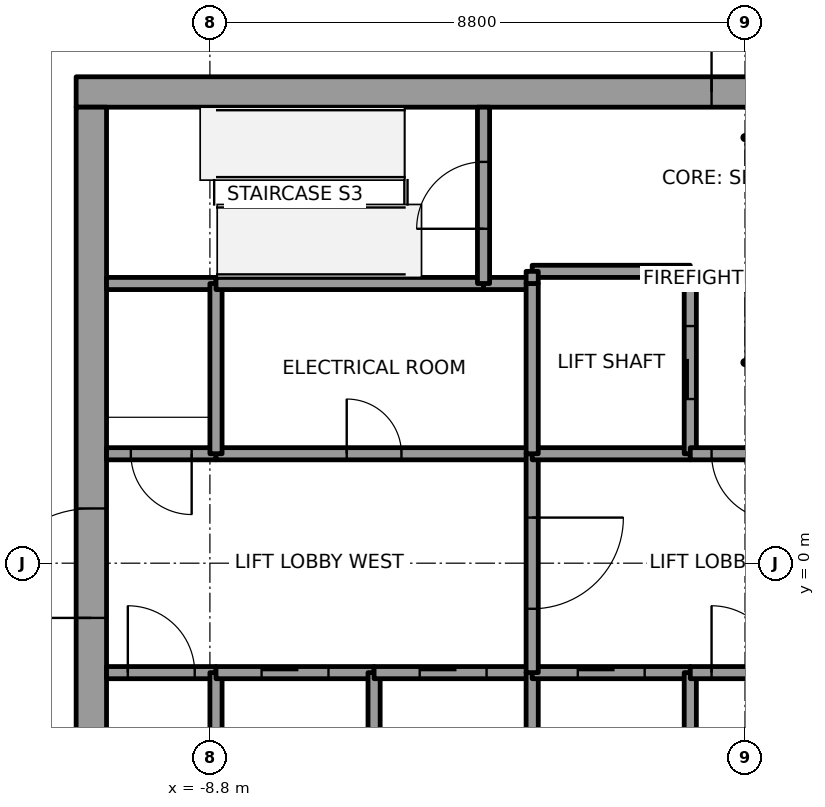
"""IFC4 building model, lengths in metres.
Left out: names, types, materials, properties, quantities, classifications, styles, units other than length and angle.
Written with IfcOpenShell. Run it as: python <this file> out.ifc"""

import sys

from ifc_helpers import new_model, si_unit, direction, frame, frame_2d, origin, place, context, subcontext, project, spatial, rectangle, extrude, element, fill, save


model = new_model("IFC4")
c1 = context("Model", 3, precision=1e-05, world=origin(), true_north=direction((0.0, 1.0)))
c2 = subcontext(c1, "Body", "Model", "MODEL_VIEW")
j1 = project(units=[si_unit("LENGTHUNIT", "METRE"), si_unit("PLANEANGLEUNIT", "RADIAN")], contexts=[c1])
p1 = place(None, origin())
s1 = spatial("IfcSite", under=j1, at=p1, CompositionType="ELEMENT")
p2 = place(p1, origin())
s2 = spatial("IfcBuilding", under=s1, at=p2, CompositionType="ELEMENT")
p3 = place(p2, frame((0.0, 0.0, 295.0)))
s3 = spatial("IfcBuildingStorey", under=s2, at=p3, CompositionType="ELEMENT", Elevation=295.0)
p4 = place(p3, frame((-11.0, 7.75, 0.0), z_axis=(0.0, 0.0, 1.0), x_axis=(1.0, 0.0, 0.0)))
e1 = element("IfcWall", 1, at=p4, inside=s3, PredefinedType="SHEAR", context=c2, shape_type="SweptSolid", body=[
    extrude(rectangle(XDim=22.0, YDim=0.5, at=frame_2d((11.0, 0.0))), origin(), (0.0, 0.0, 1.0), 4.0),
])
p5 = place(p4, frame((10.45, 0.0, 0.0)))
e2 = element("IfcOpeningElement", 2, at=p5, cuts=e1, PredefinedType="OPENING", context=c2, shape_type="SweptSolid", body=[
    extrude(rectangle(XDim=1.1, YDim=2.1, at=frame_2d((0.55, 1.05))), frame((0.0, 0.25, 0.0), z_axis=(0.0, -1.0, 0.0), x_axis=(1.0, 0.0, 0.0)), (0.0, 0.0, 1.0), 0.5),
])
p6 = place(p3, frame((-10.75, -7.5, 0.0), z_axis=(0.0, 0.0, 1.0), x_axis=(0.0, 1.0, 0.0)))
e3 = element("IfcWall", 3, at=p6, inside=s3, PredefinedType="SHEAR", context=c2, shape_type="SweptSolid", body=[
    extrude(rectangle(XDim=15.0, YDim=0.5, at=frame_2d((7.5, 0.0))), origin(), (0.0, 0.0, 1.0), 4.0),
])
p7 = place(p6, frame((6.6, 0.0, 0.0)))
e4 = element("IfcOpeningElement", 4, at=p7, cuts=e3, PredefinedType="OPENING", context=c2, shape_type="SweptSolid", body=[
    extrude(rectangle(XDim=1.8, YDim=2.1, at=frame_2d((0.9, 1.05))), frame((0.0, 0.25, 0.0), z_axis=(0.0, -1.0, 0.0), x_axis=(1.0, 0.0, 0.0)), (0.0, 0.0, 1.0), 0.5),
])
p8 = place(p3, frame((-10.5, -1.8, 0.0), z_axis=(0.0, 0.0, 1.0), x_axis=(1.0, 0.0, 0.0)))
e5 = element("IfcWall", 5, at=p8, inside=s3, PredefinedType="SOLIDWALL", context=c2, shape_type="SweptSolid", body=[
    extrude(rectangle(XDim=1.8, YDim=0.2, at=frame_2d((0.9, 0.0))), origin(), (0.0, 0.0, 1.0), 3.85),
])
p9 = place(p8, frame((0.35, 0.0, 0.0)))
e6 = element("IfcOpeningElement", 6, at=p9, cuts=e5, PredefinedType="OPENING", context=c2, shape_type="SweptSolid", body=[
    extrude(rectangle(XDim=1.1, YDim=2.1, at=frame_2d((0.55, 1.05))), frame((0.0, 0.1, 0.0), z_axis=(0.0, -1.0, 0.0), x_axis=(1.0, 0.0, 0.0)), (0.0, 0.0, 1.0), 0.2),
])
p10 = place(p3, frame((-8.7, 1.8, 0.0), z_axis=(0.0, 0.0, 1.0), x_axis=(-1.0, 0.0, 0.0)))
e7 = element("IfcWall", 7, at=p10, inside=s3, PredefinedType="SOLIDWALL", context=c2, shape_type="SweptSolid", body=[
    extrude(rectangle(XDim=1.8, YDim=0.2, at=frame_2d((0.9, 0.0))), origin(), (0.0, 0.0, 1.0), 3.85),
])
p11 = place(p10, frame((0.4, 0.0, 0.0)))
e8 = element("IfcOpeningElement", 8, at=p11, cuts=e7, PredefinedType="OPENING", context=c2, shape_type="SweptSolid", body=[
    extrude(rectangle(XDim=1.0, YDim=2.1, at=frame_2d((0.5, 1.05))), frame((0.0, 0.1, 0.0), z_axis=(0.0, -1.0, 0.0), x_axis=(1.0, 0.0, 0.0)), (0.0, 0.0, 1.0), 0.2),
])
p12 = place(p3, frame((-8.7, 4.6, 0.0), z_axis=(0.0, 0.0, 1.0), x_axis=(-1.0, 0.0, 0.0)))
e9 = element("IfcWall", 9, at=p12, inside=s3, PredefinedType="SOLIDWALL", context=c2, shape_type="SweptSolid", body=[
    extrude(rectangle(XDim=1.8, YDim=0.2, at=frame_2d((0.9, 0.0))), origin(), (0.0, 0.0, 1.0), 3.85),
])
p13 = place(p3, frame((-8.7, -4.6, 0.0), z_axis=(0.0, 0.0, 1.0), x_axis=(0.0, 1.0, 0.0)))
e10 = element("IfcWall", 10, at=p13, inside=s3, PredefinedType="SOLIDWALL", context=c2, shape_type="SweptSolid", body=[
    extrude(rectangle(XDim=2.8, YDim=0.2, at=frame_2d((1.4, 0.0))), origin(), (0.0, 0.0, 1.0), 3.85),
])
p14 = place(p3, frame((-8.7, -1.8, 0.0), z_axis=(0.0, 0.0, 1.0), x_axis=(1.0, 0.0, 0.0)))
e11 = element("IfcWall", 11, at=p14, inside=s3, PredefinedType="SOLIDWALL", context=c2, shape_type="SweptSolid", body=[
    extrude(rectangle(XDim=2.6, YDim=0.2, at=frame_2d((1.3, 0.0))), origin(), (0.0, 0.0, 1.0), 3.85),
])
p15 = place(p14, frame((0.75, 0.0, 0.0)))
e12 = element("IfcOpeningElement", 12, at=p15, cuts=e11, PredefinedType="OPENING", context=c2, shape_type="SweptSolid", body=[
    extrude(rectangle(XDim=1.1, YDim=2.1, at=frame_2d((0.55, 1.05))), frame((0.0, 0.1, 0.0), z_axis=(0.0, -1.0, 0.0), x_axis=(1.0, 0.0, 0.0)), (0.0, 0.0, 1.0), 0.2),
])
p16 = place(p3, frame((-8.7, 1.8, 0.0), z_axis=(0.0, 0.0, 1.0), x_axis=(1.0, 0.0, 0.0)))
e13 = element("IfcWall", 13, at=p16, inside=s3, PredefinedType="SOLIDWALL", context=c2, shape_type="SweptSolid", body=[
    extrude(rectangle(XDim=5.2, YDim=0.2, at=frame_2d((2.6, 0.0))), origin(), (0.0, 0.0, 1.0), 3.85),
])
p17 = place(p16, frame((2.15, 0.0, 0.0)))
e14 = element("IfcOpeningElement", 14, at=p17, cuts=e13, PredefinedType="OPENING", context=c2, shape_type="SweptSolid", body=[
    extrude(rectangle(XDim=0.9, YDim=2.1, at=frame_2d((0.45, 1.05))), frame((0.0, 0.1, 0.0), z_axis=(0.0, -1.0, 0.0), x_axis=(1.0, 0.0, 0.0)), (0.0, 0.0, 1.0), 0.2),
])
p18 = place(p3, frame((-8.7, 4.6, 0.0), z_axis=(0.0, 0.0, 1.0), x_axis=(0.0, -1.0, 0.0)))
e15 = element("IfcWall", 15, at=p18, inside=s3, PredefinedType="SOLIDWALL", context=c2, shape_type="SweptSolid", body=[
    extrude(rectangle(XDim=2.8, YDim=0.2, at=frame_2d((1.4, 0.0))), origin(), (0.0, 0.0, 1.0), 3.85),
])
p19 = place(p3, frame((-4.3, 4.6, 0.0), z_axis=(0.0, 0.0, 1.0), x_axis=(-1.0, 0.0, 0.0)))
e16 = element("IfcWall", 16, at=p19, inside=s3, PredefinedType="SOLIDWALL", context=c2, shape_type="SweptSolid", body=[
    extrude(rectangle(XDim=4.4, YDim=0.2, at=frame_2d((2.2, 0.0))), origin(), (0.0, 0.0, 1.0), 3.85),
])
p20 = place(p3, frame((-6.1, -4.6, 0.0), z_axis=(0.0, 0.0, 1.0), x_axis=(0.0, 1.0, 0.0)))
e17 = element("IfcWall", 17, at=p20, inside=s3, PredefinedType="SOLIDWALL", context=c2, shape_type="SweptSolid", body=[
    extrude(rectangle(XDim=2.8, YDim=0.2, at=frame_2d((1.4, 0.0))), origin(), (0.0, 0.0, 1.0), 3.85),
])
p21 = place(p3, frame((-6.1, -1.8, 0.0), z_axis=(0.0, 0.0, 1.0), x_axis=(1.0, 0.0, 0.0)))
e18 = element("IfcWall", 18, at=p21, inside=s3, PredefinedType="SOLIDWALL", context=c2, shape_type="SweptSolid", body=[
    extrude(rectangle(XDim=2.6, YDim=0.2, at=frame_2d((1.3, 0.0))), origin(), (0.0, 0.0, 1.0), 3.85),
])
p22 = place(p21, frame((0.75, 0.0, 0.0)))
e19 = element("IfcOpeningElement", 19, at=p22, cuts=e18, PredefinedType="OPENING", context=c2, shape_type="SweptSolid", body=[
    extrude(rectangle(XDim=1.1, YDim=2.1, at=frame_2d((0.55, 1.05))), frame((0.0, 0.1, 0.0), z_axis=(0.0, -1.0, 0.0), x_axis=(1.0, 0.0, 0.0)), (0.0, 0.0, 1.0), 0.2),
])
p23 = place(p3, frame((-3.5, 4.6, 0.0), z_axis=(0.0, 0.0, 1.0), x_axis=(-1.0, 0.0, 0.0)))
e20 = element("IfcWall", 20, at=p23, inside=s3, PredefinedType="SOLIDWALL", context=c2, shape_type="SweptSolid", body=[
    extrude(rectangle(XDim=0.8, YDim=0.2, at=frame_2d((0.4, 0.0))), origin(), (0.0, 0.0, 1.0), 3.85),
])
p24 = place(p3, frame((-4.3, 4.6, 0.0), z_axis=(0.0, 0.0, 1.0), x_axis=(0.0, 1.0, 0.0)))
e21 = element("IfcWall", 21, at=p24, inside=s3, PredefinedType="SOLIDWALL", context=c2, shape_type="SweptSolid", body=[
    extrude(rectangle(XDim=2.9, YDim=0.2, at=frame_2d((1.45, 0.0))), origin(), (0.0, 0.0, 1.0), 3.85),
])
p25 = place(p24, frame((0.9, 0.0, 0.0)))
e22 = element("IfcOpeningElement", 22, at=p25, cuts=e21, PredefinedType="OPENING", context=c2, shape_type="SweptSolid", body=[
    extrude(rectangle(XDim=1.1, YDim=2.1, at=frame_2d((0.55, 1.05))), frame((0.0, 0.1, 0.0), z_axis=(0.0, -1.0, 0.0), x_axis=(1.0, 0.0, 0.0)), (0.0, 0.0, 1.0), 0.2),
])
p26 = place(p3, frame((-3.5, -4.6, 0.0), z_axis=(0.0, 0.0, 1.0), x_axis=(0.0, 1.0, 0.0)))
e23 = element("IfcWall", 23, at=p26, inside=s3, PredefinedType="SOLIDWALL", context=c2, shape_type="SweptSolid", body=[
    extrude(rectangle(XDim=2.8, YDim=0.2, at=frame_2d((1.4, 0.0))), origin(), (0.0, 0.0, 1.0), 3.85),
])
p27 = place(p3, frame((-3.5, -1.8, 0.0), z_axis=(0.0, 0.0, 1.0), x_axis=(1.0, 0.0, 0.0)))
e24 = element("IfcWall", 24, at=p27, inside=s3, PredefinedType="SOLIDWALL", context=c2, shape_type="SweptSolid", body=[
    extrude(rectangle(XDim=2.6, YDim=0.2, at=frame_2d((1.3, 0.0))), origin(), (0.0, 0.0, 1.0), 3.85),
])
p28 = place(p27, frame((0.75, 0.0, 0.0)))
e25 = element("IfcOpeningElement", 25, at=p28, cuts=e24, PredefinedType="OPENING", context=c2, shape_type="SweptSolid", body=[
    extrude(rectangle(XDim=1.1, YDim=2.1, at=frame_2d((0.55, 1.05))), frame((0.0, 0.1, 0.0), z_axis=(0.0, -1.0, 0.0), x_axis=(1.0, 0.0, 0.0)), (0.0, 0.0, 1.0), 0.2),
])
p29 = place(p3, frame((-3.5, 1.8, 0.0), z_axis=(0.0, 0.0, 1.0), x_axis=(0.0, -1.0, 0.0)))
e26 = element("IfcWall", 26, at=p29, inside=s3, PredefinedType="SOLIDWALL", context=c2, shape_type="SweptSolid", body=[
    extrude(rectangle(XDim=3.6, YDim=0.2, at=frame_2d((1.8, 0.0))), origin(), (0.0, 0.0, 1.0), 3.85),
])
p30 = place(p29, frame((1.05, 0.0, 0.0)))
e27 = element("IfcOpeningElement", 27, at=p30, cuts=e26, PredefinedType="OPENING", context=c2, shape_type="SweptSolid", body=[
    extrude(rectangle(XDim=1.5, YDim=2.1, at=frame_2d((0.75, 1.05))), frame((0.0, 0.1, 0.0), z_axis=(0.0, -1.0, 0.0), x_axis=(1.0, 0.0, 0.0)), (0.0, 0.0, 1.0), 0.2),
])
p31 = place(p3, frame((-0.9, 1.8, 0.0), z_axis=(0.0, 0.0, 1.0), x_axis=(-1.0, 0.0, 0.0)))
e28 = element("IfcWall", 28, at=p31, inside=s3, PredefinedType="SOLIDWALL", context=c2, shape_type="SweptSolid", body=[
    extrude(rectangle(XDim=2.6, YDim=0.2, at=frame_2d((1.3, 0.0))), origin(), (0.0, 0.0, 1.0), 3.85),
])
p32 = place(p3, frame((-3.5, 1.8, 0.0), z_axis=(0.0, 0.0, 1.0), x_axis=(0.0, 1.0, 0.0)))
e29 = element("IfcWall", 29, at=p32, inside=s3, PredefinedType="SOLIDWALL", context=c2, shape_type="SweptSolid", body=[
    extrude(rectangle(XDim=2.8, YDim=0.2, at=frame_2d((1.4, 0.0))), origin(), (0.0, 0.0, 1.0), 3.85),
])
p33 = place(p3, frame((-0.9, 1.8, 0.0), z_axis=(0.0, 0.0, 1.0), x_axis=(0.0, 1.0, 0.0)))
e30 = element("IfcWall", 30, at=p33, inside=s3, PredefinedType="SOLIDWALL", context=c2, shape_type="SweptSolid", body=[
    extrude(rectangle(XDim=3.0, YDim=0.2, at=frame_2d((1.5, 0.0))), origin(), (0.0, 0.0, 1.0), 3.85),
])
p34 = place(p33, frame((0.9, 0.0, 0.0)))
e31 = element("IfcOpeningElement", 31, at=p34, cuts=e30, PredefinedType="OPENING", context=c2, shape_type="SweptSolid", body=[
    extrude(rectangle(XDim=1.2, YDim=2.1, at=frame_2d((0.6, 1.05))), frame((0.0, 0.1, 0.0), z_axis=(0.0, -1.0, 0.0), x_axis=(1.0, 0.0, 0.0)), (0.0, 0.0, 1.0), 0.2),
])
p35 = place(p3, frame((-0.9, 4.8, 0.0), z_axis=(0.0, 0.0, 1.0), x_axis=(-1.0, 0.0, 0.0)))
e32 = element("IfcWall", 32, at=p35, inside=s3, PredefinedType="SOLIDWALL", context=c2, shape_type="SweptSolid", body=[
    extrude(rectangle(XDim=2.6, YDim=0.2, at=frame_2d((1.3, 0.0))), origin(), (0.0, 0.0, 1.0), 3.85),
])
p36 = place(p3, frame((-3.5, 4.8, 0.0), z_axis=(0.0, 0.0, 1.0), x_axis=(0.0, -1.0, 0.0)))
e33 = element("IfcWall", 33, at=p36, inside=s3, PredefinedType="SOLIDWALL", context=c2, shape_type="SweptSolid", body=[
    extrude(rectangle(XDim=0.2, YDim=0.2, at=frame_2d((0.1, 0.0))), origin(), (0.0, 0.0, 1.0), 3.85),
])
p37 = place(p3, frame((-0.9, -4.6, 0.0), z_axis=(0.0, 0.0, 1.0), x_axis=(0.0, 1.0, 0.0)))
e34 = element("IfcWall", 34, at=p37, inside=s3, PredefinedType="SOLIDWALL", context=c2, shape_type="SweptSolid", body=[
    extrude(rectangle(XDim=2.8, YDim=0.2, at=frame_2d((1.4, 0.0))), origin(), (0.0, 0.0, 1.0), 3.85),
])
p38 = place(p3, frame((-0.9, -1.8, 0.0), z_axis=(0.0, 0.0, 1.0), x_axis=(1.0, 0.0, 0.0)))
e35 = element("IfcWall", 35, at=p38, inside=s3, PredefinedType="SOLIDWALL", context=c2, shape_type="SweptSolid", body=[
    extrude(rectangle(XDim=1.8, YDim=0.2, at=frame_2d((0.9, 0.0))), origin(), (0.0, 0.0, 1.0), 3.85),
])
p39 = place(p38, frame((0.35, 0.0, 0.0)))
e36 = element("IfcOpeningElement", 36, at=p39, cuts=e35, PredefinedType="OPENING", context=c2, shape_type="SweptSolid", body=[
    extrude(rectangle(XDim=1.1, YDim=2.1, at=frame_2d((0.55, 1.05))), frame((0.0, 0.1, 0.0), z_axis=(0.0, -1.0, 0.0), x_axis=(1.0, 0.0, 0.0)), (0.0, 0.0, 1.0), 0.2),
])
p40 = place(p3, frame((0.9, 1.8, 0.0), z_axis=(0.0, 0.0, 1.0), x_axis=(-1.0, 0.0, 0.0)))
e37 = element("IfcWall", 37, at=p40, inside=s3, PredefinedType="SOLIDWALL", context=c2, shape_type="SweptSolid", body=[
    extrude(rectangle(XDim=1.8, YDim=0.2, at=frame_2d((0.9, 0.0))), origin(), (0.0, 0.0, 1.0), 3.85),
])
p41 = place(p40, frame((0.35, 0.0, 0.0)))
e38 = element("IfcOpeningElement", 38, at=p41, cuts=e37, PredefinedType="OPENING", context=c2, shape_type="SweptSolid", body=[
    extrude(rectangle(XDim=1.1, YDim=2.1, at=frame_2d((0.55, 1.05))), frame((0.0, 0.1, 0.0), z_axis=(0.0, -1.0, 0.0), x_axis=(1.0, 0.0, 0.0)), (0.0, 0.0, 1.0), 0.2),
])
p42 = place(p15, origin())
e39 = element("IfcDoor", 39, at=p42, inside=s3, OperationType="SLIDING_TO_LEFT", PredefinedType="DOOR", context=c2, shape_type="SweptSolid", body=[
    extrude(rectangle(XDim=1.1, YDim=2.1, at=frame_2d((0.55, 1.05))), frame((0.0, 0.025, 0.0), z_axis=(0.0, -1.0, 0.0), x_axis=(1.0, 0.0, 0.0)), (0.0, 0.0, 1.0), 0.05),
])
fill(e12, e39)
p43 = place(p22, origin())
e40 = element("IfcDoor", 40, at=p43, inside=s3, OperationType="SLIDING_TO_RIGHT", PredefinedType="DOOR", context=c2, shape_type="SweptSolid", body=[
    extrude(rectangle(XDim=1.1, YDim=2.1, at=frame_2d((0.55, 1.05))), frame((0.0, 0.025, 0.0), z_axis=(0.0, -1.0, 0.0), x_axis=(1.0, 0.0, 0.0)), (0.0, 0.0, 1.0), 0.05),
])
fill(e19, e40)
p44 = place(p28, origin())
e41 = element("IfcDoor", 41, at=p44, inside=s3, OperationType="SLIDING_TO_RIGHT", PredefinedType="DOOR", context=c2, shape_type="SweptSolid", body=[
    extrude(rectangle(XDim=1.1, YDim=2.1, at=frame_2d((0.55, 1.05))), frame((0.0, 0.025, 0.0), z_axis=(0.0, -1.0, 0.0), x_axis=(1.0, 0.0, 0.0)), (0.0, 0.0, 1.0), 0.05),
])
fill(e25, e41)
p45 = place(p34, origin())
e42 = element("IfcDoor", 42, at=p45, inside=s3, OperationType="SLIDING_TO_RIGHT", PredefinedType="DOOR", context=c2, shape_type="SweptSolid", body=[
    extrude(rectangle(XDim=1.2, YDim=2.1, at=frame_2d((0.6, 1.05))), frame((0.0, 0.025, 0.0), z_axis=(0.0, -1.0, 0.0), x_axis=(1.0, 0.0, 0.0)), (0.0, 0.0, 1.0), 0.05),
])
fill(e31, e42)
p46 = place(p30, origin())
e43 = element("IfcDoor", 43, at=p46, inside=s3, OperationType="DOUBLE_DOOR_SINGLE_SWING", PredefinedType="DOOR", context=c2, shape_type="SweptSolid", body=[
    extrude(rectangle(XDim=1.5, YDim=2.1, at=frame_2d((0.75, 1.05))), frame((0.0, 0.025, 0.0), z_axis=(0.0, -1.0, 0.0), x_axis=(1.0, 0.0, 0.0)), (0.0, 0.0, 1.0), 0.05),
])
fill(e27, e43)
p47 = place(p9, origin())
e44 = element("IfcDoor", 44, at=p47, inside=s3, OperationType="SINGLE_SWING_LEFT", PredefinedType="DOOR", context=c2, shape_type="SweptSolid", body=[
    extrude(rectangle(XDim=1.1, YDim=2.1, at=frame_2d((0.55, 1.05))), frame((0.0, 0.025, 0.0), z_axis=(0.0, -1.0, 0.0), x_axis=(1.0, 0.0, 0.0)), (0.0, 0.0, 1.0), 0.05),
])
fill(e6, e44)
p48 = place(p41, origin())
e45 = element("IfcDoor", 45, at=p48, inside=s3, OperationType="SINGLE_SWING_RIGHT", PredefinedType="DOOR", context=c2, shape_type="SweptSolid", body=[
    extrude(rectangle(XDim=1.1, YDim=2.1, at=frame_2d((0.55, 1.05))), frame((0.0, 0.025, 0.0), z_axis=(0.0, -1.0, 0.0), x_axis=(1.0, 0.0, 0.0)), (0.0, 0.0, 1.0), 0.05),
])
fill(e38, e45)
p49 = place(p39, origin())
e46 = element("IfcDoor", 46, at=p49, inside=s3, OperationType="SINGLE_SWING_RIGHT", PredefinedType="DOOR", context=c2, shape_type="SweptSolid", body=[
    extrude(rectangle(XDim=1.1, YDim=2.1, at=frame_2d((0.55, 1.05))), frame((0.0, 0.025, 0.0), z_axis=(0.0, -1.0, 0.0), x_axis=(1.0, 0.0, 0.0)), (0.0, 0.0, 1.0), 0.05),
])
fill(e36, e46)
p50 = place(p11, origin())
e47 = element("IfcDoor", 47, at=p50, inside=s3, OperationType="SINGLE_SWING_RIGHT", PredefinedType="DOOR", context=c2, shape_type="SweptSolid", body=[
    extrude(rectangle(XDim=1.0, YDim=2.1, at=frame_2d((0.5, 1.05))), frame((0.0, 0.025, 0.0), z_axis=(0.0, -1.0, 0.0), x_axis=(1.0, 0.0, 0.0)), (0.0, 0.0, 1.0), 0.05),
])
fill(e8, e47)
p51 = place(p25, origin())
e48 = element("IfcDoor", 48, at=p51, inside=s3, OperationType="SINGLE_SWING_LEFT", PredefinedType="DOOR", context=c2, shape_type="SweptSolid", body=[
    extrude(rectangle(XDim=1.1, YDim=2.1, at=frame_2d((0.55, 1.05))), frame((0.0, 0.025, 0.0), z_axis=(0.0, -1.0, 0.0), x_axis=(1.0, 0.0, 0.0)), (0.0, 0.0, 1.0), 0.05),
])
fill(e22, e48)
p52 = place(p17, origin())
e49 = element("IfcDoor", 49, at=p52, inside=s3, OperationType="SINGLE_SWING_RIGHT", PredefinedType="DOOR", context=c2, shape_type="SweptSolid", body=[
    extrude(rectangle(XDim=0.9, YDim=2.1, at=frame_2d((0.45, 1.05))), frame((0.0, 0.025, 0.0), z_axis=(0.0, -1.0, 0.0), x_axis=(1.0, 0.0, 0.0)), (0.0, 0.0, 1.0), 0.05),
])
fill(e14, e49)
p53 = place(p7, origin())
e50 = element("IfcDoor", 50, at=p53, inside=s3, OperationType="DOUBLE_DOOR_SINGLE_SWING", PredefinedType="DOOR", context=c2, shape_type="SweptSolid", body=[
    extrude(rectangle(XDim=1.8, YDim=2.1, at=frame_2d((0.9, 1.05))), frame((0.0, 0.025, 0.0), z_axis=(0.0, -1.0, 0.0), x_axis=(1.0, 0.0, 0.0)), (0.0, 0.0, 1.0), 0.05),
])
fill(e4, e50)
p54 = place(p5, origin())
e51 = element("IfcDoor", 51, at=p54, inside=s3, OperationType="SINGLE_SWING_RIGHT", PredefinedType="DOOR", context=c2, shape_type="SweptSolid", body=[
    extrude(rectangle(XDim=1.1, YDim=2.1, at=frame_2d((0.55, 1.05))), frame((0.0, 0.025, 0.0), z_axis=(0.0, -1.0, 0.0), x_axis=(1.0, 0.0, 0.0)), (0.0, 0.0, 1.0), 0.05),
])
fill(e2, e51)
save(model, sys.argv[1])
